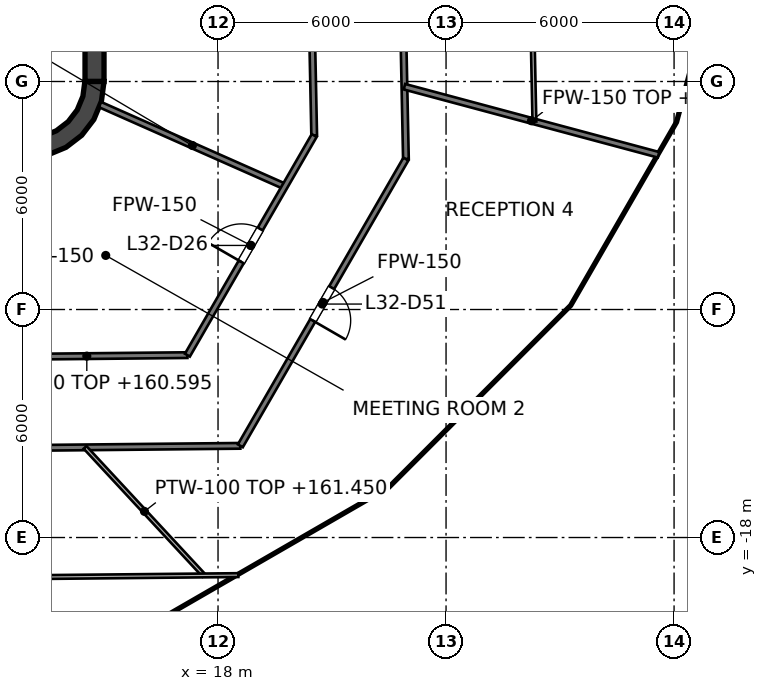
"""IFC4 building model, lengths in metres.
Left out: names, types, materials, properties, quantities, classifications, styles, units other than length and angle.
Written with IfcOpenShell. Run it as: python <this file> out.ifc"""

import sys

from ifc_helpers import new_model, si_unit, direction, frame, frame_2d, origin, place, context, subcontext, project, spatial, polyline, rectangle, outline, extrude, element, fill, save


model = new_model("IFC4")
c1 = context("Model", 3, precision=1e-05, world=origin(), true_north=direction((0.0, 1.0)))
c2 = subcontext(c1, "Body", "Model", "MODEL_VIEW")
j1 = project(units=[si_unit("LENGTHUNIT", "METRE"), si_unit("PLANEANGLEUNIT", "RADIAN")], contexts=[c1])
p1 = place(None, origin())
s1 = spatial("IfcSite", under=j1, at=p1, CompositionType="ELEMENT")
p2 = place(p1, origin())
s2 = spatial("IfcBuilding", under=s1, at=p2, CompositionType="ELEMENT")
p3 = place(p2, frame((0.0, 0.0, 157.6)))
s3 = spatial("IfcBuildingStorey", under=s2, at=p3, CompositionType="ELEMENT", Elevation=157.6)
p4 = place(p3, frame((14.75, -6.0, 0.0), z_axis=(0.0, 0.0, 1.0), x_axis=(0.0, 1.0, 0.0)))
e1 = element("IfcWall", 1, at=p4, inside=s3, PredefinedType="SHEAR", context=c2, shape_type="SweptSolid", body=[
    extrude(rectangle(XDim=12.0, YDim=0.5, at=frame_2d((6.0, 0.0))), origin(), (0.0, 0.0, 1.0), 4.0),
])
p5 = place(p3, origin())
e2 = element("IfcWall", 2, at=p5, inside=s3, PredefinedType="SHEAR", context=c2, shape_type="SweptSolid", body=[
    extrude(outline(polyline([(15.0, -6.0), (14.496, -6.0), (14.445, -6.387), (14.295, -6.748), (14.058, -7.058), (13.748, -7.295), (13.387, -7.445), (13.0, -7.496), (13.0, -8.0), (13.518, -7.932), (14.0, -7.732), (14.414, -7.414), (14.732, -7.0), (14.932, -6.518), (15.0, -6.0)])), origin(), (0.0, 0.0, 1.0), 4.0),
])
e3 = element("IfcWall", 3, at=p5, inside=s3, PredefinedType="SOLIDWALL", context=c2, shape_type="SweptSolid", body=[
    extrude(outline(polyline([(12.0, -5.675), (12.0, -5.925), (14.25, -5.925), (14.5, -5.925), (14.5, -5.675), (14.5, -3.025), (14.5, -2.775), (14.5, -0.125), (14.5, 0.125), (14.5, 2.775), (14.5, 3.025), (14.5, 5.675), (14.5, 5.925), (14.25, 5.925), (12.0, 5.925), (12.0, 5.675), (14.25, 5.675), (14.25, 3.025), (12.0, 3.025), (12.0, 2.775), (14.25, 2.775), (14.25, 0.125), (12.0, 0.125), (12.0, -0.125), (14.25, -0.125), (14.25, -2.775), (12.0, -2.775), (12.0, -3.025), (14.25, -3.025), (14.25, -5.675), (12.0, -5.675)])), origin(), (0.0, 0.0, 1.0), 3.85),
])
p6 = place(p3, frame((20.167, 10.213, 0.0), z_axis=(0.0, 0.0, 1.0), x_axis=(0.020610894613, -0.999787572949, 0.0)))
e4 = element("IfcWall", 4, at=p6, inside=s3, PredefinedType="PARTITIONING", context=c2, shape_type="SweptSolid", body=[
    extrude(rectangle(XDim=17.637, YDim=0.15, at=frame_2d((8.819, 0.0))), origin(), (0.0, 0.0, 1.0), 2.927),
])
p7 = place(p6, frame((10.508, 0.0, 0.0)))
e5 = element("IfcOpeningElement", 5, at=p7, cuts=e4, PredefinedType="OPENING", context=c2, shape_type="SweptSolid", body=[
    extrude(rectangle(XDim=1.0, YDim=2.1, at=frame_2d((0.5, 1.05))), frame((0.0, 0.075, 0.0), z_axis=(0.0, -1.0, 0.0), x_axis=(1.0, 0.0, 0.0)), (0.0, 0.0, 1.0), 0.15),
])
p8 = place(p6, frame((5.09, 0.0, 0.0)))
e6 = element("IfcOpeningElement", 6, at=p8, cuts=e4, PredefinedType="OPENING", context=c2, shape_type="SweptSolid", body=[
    extrude(rectangle(XDim=1.0, YDim=2.1, at=frame_2d((0.5, 1.05))), frame((0.0, 0.075, 0.0), z_axis=(0.0, -1.0, 0.0), x_axis=(1.0, 0.0, 0.0)), (0.0, 0.0, 1.0), 0.15),
])
p9 = place(p3, frame((22.539, 11.615, 0.0), z_axis=(0.0, 0.0, 1.0), x_axis=(0.020601506683, -0.99978776644, 0.0)))
e7 = element("IfcWall", 7, at=p9, inside=s3, PredefinedType="PARTITIONING", context=c2, shape_type="SweptSolid", body=[
    extrude(rectangle(XDim=19.66, YDim=0.15, at=frame_2d((9.83, 0.0))), origin(), (0.0, 0.0, 1.0), 2.927),
])
p10 = place(p9, frame((13.341, 0.0, 0.0)))
e8 = element("IfcOpeningElement", 8, at=p10, cuts=e7, PredefinedType="OPENING", context=c2, shape_type="SweptSolid", body=[
    extrude(rectangle(XDim=1.0, YDim=2.1, at=frame_2d((0.5, 1.05))), frame((0.0, 0.075, 0.0), z_axis=(0.0, -1.0, 0.0), x_axis=(1.0, 0.0, 0.0)), (0.0, 0.0, 1.0), 0.15),
])
p11 = place(p9, frame((3.51, 0.0, 0.0)))
e9 = element("IfcOpeningElement", 9, at=p11, cuts=e7, PredefinedType="OPENING", context=c2, shape_type="SweptSolid", body=[
    extrude(rectangle(XDim=1.0, YDim=2.1, at=frame_2d((0.5, 1.05))), frame((0.0, 0.075, 0.0), z_axis=(0.0, -1.0, 0.0), x_axis=(1.0, 0.0, 0.0)), (0.0, 0.0, 1.0), 0.15),
])
p12 = place(p3, frame((14.895, -6.607, 0.0), z_axis=(0.0, 0.0, 1.0), x_axis=(0.914233271379, -0.405188259337, 0.0)))
e10 = element("IfcWall", 10, at=p12, inside=s3, PredefinedType="PARTITIONING", context=c2, shape_type="SweptSolid", body=[
    extrude(rectangle(XDim=5.317, YDim=0.15, at=frame_2d((2.659, 0.0))), origin(), (0.0, 0.0, 1.0), 2.995),
])
p13 = place(p3, frame((22.905, -6.137, 0.0), z_axis=(0.0, 0.0, 1.0), x_axis=(0.965908688021, -0.25888299752, 0.0)))
e11 = element("IfcWall", 11, at=p13, inside=s3, PredefinedType="PARTITIONING", context=c2, shape_type="SweptSolid", body=[
    extrude(rectangle(XDim=6.922, YDim=0.15, at=frame_2d((3.461, 0.0))), origin(), (0.0, 0.0, 1.0), 3.527),
])
p14 = place(p3, frame((-14.534, -15.915, 0.0), z_axis=(0.0, 0.0, 1.0), x_axis=(0.999950930262, 0.009906415532, 0.0)))
e12 = element("IfcWall", 12, at=p14, inside=s3, PredefinedType="PARTITIONING", context=c2, shape_type="SweptSolid", body=[
    extrude(rectangle(XDim=33.123, YDim=0.15, at=frame_2d((16.561, 0.0))), origin(), (0.0, 0.0, 1.0), 2.927),
])
p15 = place(p14, frame((4.106, 0.0, 0.0)))
e13 = element("IfcOpeningElement", 13, at=p15, cuts=e12, PredefinedType="OPENING", context=c2, shape_type="SweptSolid", body=[
    extrude(rectangle(XDim=1.2, YDim=2.1, at=frame_2d((0.6, 1.05))), frame((0.0, 0.075, 0.0), z_axis=(0.0, -1.0, 0.0), x_axis=(1.0, 0.0, 0.0)), (0.0, 0.0, 1.0), 0.15),
])
p16 = place(p14, frame((10.434, 0.0, 0.0)))
e14 = element("IfcOpeningElement", 14, at=p16, cuts=e12, PredefinedType="OPENING", context=c2, shape_type="SweptSolid", body=[
    extrude(rectangle(XDim=1.0, YDim=2.1, at=frame_2d((0.5, 1.05))), frame((0.0, 0.075, 0.0), z_axis=(0.0, -1.0, 0.0), x_axis=(1.0, 0.0, 0.0)), (0.0, 0.0, 1.0), 0.15),
])
p17 = place(p14, frame((12.942, 0.0, 0.0)))
e15 = element("IfcOpeningElement", 15, at=p17, cuts=e12, PredefinedType="OPENING", context=c2, shape_type="SweptSolid", body=[
    extrude(rectangle(XDim=1.0, YDim=2.1, at=frame_2d((0.5, 1.05))), frame((0.0, 0.075, 0.0), z_axis=(0.0, -1.0, 0.0), x_axis=(1.0, 0.0, 0.0)), (0.0, 0.0, 1.0), 0.15),
])
p18 = place(p14, frame((16.111, 0.0, 0.0)))
e16 = element("IfcOpeningElement", 16, at=p18, cuts=e12, PredefinedType="OPENING", context=c2, shape_type="SweptSolid", body=[
    extrude(rectangle(XDim=1.0, YDim=2.1, at=frame_2d((0.5, 1.05))), frame((0.0, 0.075, 0.0), z_axis=(0.0, -1.0, 0.0), x_axis=(1.0, 0.0, 0.0)), (0.0, 0.0, 1.0), 0.15),
])
p19 = place(p14, frame((24.318, 0.0, 0.0)))
e17 = element("IfcOpeningElement", 17, at=p19, cuts=e12, PredefinedType="OPENING", context=c2, shape_type="SweptSolid", body=[
    extrude(rectangle(XDim=1.0, YDim=2.1, at=frame_2d((0.5, 1.05))), frame((0.0, 0.075, 0.0), z_axis=(0.0, -1.0, 0.0), x_axis=(1.0, 0.0, 0.0)), (0.0, 0.0, 1.0), 0.15),
])
p20 = place(p3, frame((11.9, -13.253, 0.0), z_axis=(0.0, 0.0, 1.0), x_axis=(0.999950853109, 0.009914200296, 0.0)))
e18 = element("IfcWall", 18, at=p20, inside=s3, PredefinedType="PARTITIONING", context=c2, shape_type="SweptSolid", body=[
    extrude(rectangle(XDim=5.294, YDim=0.15, at=frame_2d((2.647, 0.0))), origin(), (0.0, 0.0, 1.0), 2.995),
])
p21 = place(p3, frame((18.587, -15.587, 0.0), z_axis=(0.0, 0.0, 1.0), x_axis=(0.500005419212, 0.866022274979, 0.0)))
e19 = element("IfcWall", 19, at=p21, inside=s3, PredefinedType="PARTITIONING", context=c2, shape_type="SweptSolid", body=[
    extrude(rectangle(XDim=8.713, YDim=0.15, at=frame_2d((4.357, 0.0))), origin(), (0.0, 0.0, 1.0), 2.927),
])
p22 = place(p21, frame((3.808, 0.0, 0.0)))
e20 = element("IfcOpeningElement", 20, at=p22, cuts=e19, PredefinedType="OPENING", context=c2, shape_type="SweptSolid", body=[
    extrude(rectangle(XDim=1.0, YDim=2.1, at=frame_2d((0.5, 1.05))), frame((0.0, 0.075, 0.0), z_axis=(0.0, -1.0, 0.0), x_axis=(1.0, 0.0, 0.0)), (0.0, 0.0, 1.0), 0.15),
])
p23 = place(p3, frame((17.194, -13.201, 0.0), z_axis=(0.0, 0.0, 1.0), x_axis=(0.499983182885, 0.866035112932, 0.0)))
e21 = element("IfcWall", 21, at=p23, inside=s3, PredefinedType="PARTITIONING", context=c2, shape_type="SweptSolid", body=[
    extrude(rectangle(XDim=6.674, YDim=0.15, at=frame_2d((3.337, 0.0))), origin(), (0.0, 0.0, 1.0), 2.927),
])
p24 = place(p23, frame((2.834, 0.0, 0.0)))
e22 = element("IfcOpeningElement", 22, at=p24, cuts=e21, PredefinedType="OPENING", context=c2, shape_type="SweptSolid", body=[
    extrude(rectangle(XDim=1.0, YDim=2.1, at=frame_2d((0.5, 1.05))), frame((0.0, 0.075, 0.0), z_axis=(0.0, -1.0, 0.0), x_axis=(1.0, 0.0, 0.0)), (0.0, 0.0, 1.0), 0.15),
])
p25 = place(p3, frame((25.905, 13.295, 0.0), z_axis=(0.0, 0.0, 1.0), x_axis=(0.020631727872, -0.999787143249, 0.0)))
e23 = element("IfcWall", 23, at=p25, inside=s3, PredefinedType="PARTITIONING", context=c2, shape_type="SweptSolid", body=[
    extrude(rectangle(XDim=20.353, YDim=0.1, at=frame_2d((10.177, 0.0))), origin(), (0.0, 0.0, 1.0), 2.927),
])
p26 = place(p25, frame((4.737, 0.0, 0.0)))
e24 = element("IfcOpeningElement", 24, at=p26, cuts=e23, PredefinedType="OPENING", context=c2, shape_type="SweptSolid", body=[
    extrude(rectangle(XDim=0.9, YDim=2.1, at=frame_2d((0.45, 1.05))), frame((0.0, 0.05, 0.0), z_axis=(0.0, -1.0, 0.0), x_axis=(1.0, 0.0, 0.0)), (0.0, 0.0, 1.0), 0.1),
])
p27 = place(p3, frame((14.501, -15.628, 0.0), z_axis=(0.0, 0.0, 1.0), x_axis=(0.680157643832, -0.73306587667, 0.0)))
e25 = element("IfcWall", 25, at=p27, inside=s3, PredefinedType="PARTITIONING", context=c2, shape_type="SweptSolid", body=[
    extrude(rectangle(XDim=4.596, YDim=0.1, at=frame_2d((2.298, 0.0))), origin(), (0.0, 0.0, 1.0), 3.85),
])
p28 = place(p3, frame((-15.194, -19.323, 0.0), z_axis=(0.0, 0.0, 1.0), x_axis=(0.999950976029, 0.009901794681, 0.0)))
e26 = element("IfcWall", 26, at=p28, inside=s3, PredefinedType="PARTITIONING", context=c2, shape_type="SweptSolid", body=[
    extrude(rectangle(XDim=33.73, YDim=0.1, at=frame_2d((16.865, 0.0))), origin(), (0.0, 0.0, 1.0), 2.927),
])
p29 = place(p28, frame((4.043, 0.0, 0.0)))
e27 = element("IfcOpeningElement", 27, at=p29, cuts=e26, PredefinedType="OPENING", context=c2, shape_type="SweptSolid", body=[
    extrude(rectangle(XDim=0.9, YDim=2.1, at=frame_2d((0.45, 1.05))), frame((0.0, 0.05, 0.0), z_axis=(0.0, -1.0, 0.0), x_axis=(1.0, 0.0, 0.0)), (0.0, 0.0, 1.0), 0.1),
])
p30 = place(p28, frame((26.398, 0.0, 0.0)))
e28 = element("IfcOpeningElement", 28, at=p30, cuts=e26, PredefinedType="OPENING", context=c2, shape_type="SweptSolid", body=[
    extrude(rectangle(XDim=0.9, YDim=2.1, at=frame_2d((0.45, 1.05))), frame((0.0, 0.05, 0.0), z_axis=(0.0, -1.0, 0.0), x_axis=(1.0, 0.0, 0.0)), (0.0, 0.0, 1.0), 0.1),
])
p31 = place(p24, origin())
e29 = element("IfcDoor", 29, at=p31, inside=s3, OperationType="SINGLE_SWING_LEFT", PredefinedType="DOOR", context=c2, shape_type="SweptSolid", body=[
    extrude(rectangle(XDim=1.0, YDim=2.1, at=frame_2d((0.5, 1.05))), frame((0.0, 0.025, 0.0), z_axis=(0.0, -1.0, 0.0), x_axis=(1.0, 0.0, 0.0)), (0.0, 0.0, 1.0), 0.05),
])
fill(e22, e29)
p32 = place(p22, origin())
e30 = element("IfcDoor", 30, at=p32, inside=s3, OperationType="SINGLE_SWING_LEFT", PredefinedType="DOOR", context=c2, shape_type="SweptSolid", body=[
    extrude(rectangle(XDim=1.0, YDim=2.1, at=frame_2d((0.5, 1.05))), frame((0.0, 0.025, 0.0), z_axis=(0.0, -1.0, 0.0), x_axis=(1.0, 0.0, 0.0)), (0.0, 0.0, 1.0), 0.05),
])
fill(e20, e30)
save(model, sys.argv[1])
